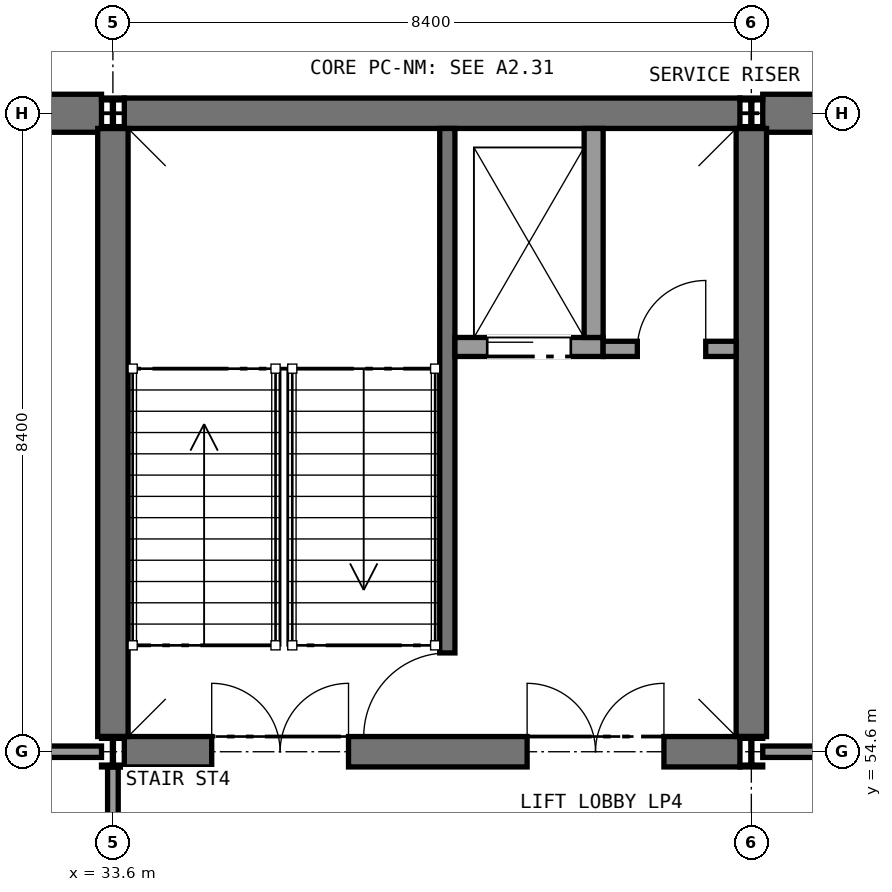
"""IFC4 building model, lengths in metres.
Left out: names, types, materials, properties, quantities, classifications, styles, units other than length and angle.
Written with IfcOpenShell. Run it as: python <this file> out.ifc"""

import sys

from ifc_helpers import new_model, si_unit, direction, frame, frame_2d, origin, origin_2d, place, context, subcontext, project, spatial, rectangle, i_section, extrude, element, fill, save


model = new_model("IFC4")
c1 = context("Model", 3, precision=1e-05, world=origin(), true_north=direction((0.0, 1.0)))
c2 = subcontext(c1, "Body", "Model", "MODEL_VIEW")
j1 = project(units=[si_unit("LENGTHUNIT", "METRE"), si_unit("PLANEANGLEUNIT", "RADIAN")], contexts=[c1])
p1 = place(None, origin())
s1 = spatial("IfcSite", under=j1, at=p1, CompositionType="ELEMENT")
p2 = place(p1, origin())
s2 = spatial("IfcBuilding", under=s1, at=p2, CompositionType="ELEMENT")
p3 = place(p2, frame((0.0, 0.0, 21.0)))
s3 = spatial("IfcBuildingStorey", under=s2, at=p3, CompositionType="ELEMENT", Elevation=21.0)
p4 = place(p3, frame((25.35, 63.0, 0.0), z_axis=(0.0, 0.0, 1.0), x_axis=(1.0, 0.0, 0.0)))
e1 = element("IfcWall", 1, at=p4, inside=s3, PredefinedType="SHEAR", context=c2, shape_type="SweptSolid", body=[
    extrude(rectangle(XDim=8.1, YDim=0.5, at=frame_2d((4.05, 0.0))), origin(), (0.0, 0.0, 1.0), 4.65),
])
p5 = place(p3, frame((42.15, 63.0, 0.0), z_axis=(0.0, 0.0, 1.0), x_axis=(1.0, 0.0, 0.0)))
e2 = element("IfcWall", 2, at=p5, inside=s3, PredefinedType="SHEAR", context=c2, shape_type="SweptSolid", body=[
    extrude(rectangle(XDim=8.1, YDim=0.5, at=frame_2d((4.05, 0.0))), origin(), (0.0, 0.0, 1.0), 4.65),
])
p6 = place(p3, frame((33.75, 63.0, 0.0), z_axis=(0.0, 0.0, 1.0), x_axis=(1.0, 0.0, 0.0)))
e3 = element("IfcWall", 3, at=p6, inside=s3, PredefinedType="SHEAR", context=c2, shape_type="SweptSolid", body=[
    extrude(rectangle(XDim=8.1, YDim=0.4, at=frame_2d((4.05, 0.0))), origin(), (0.0, 0.0, 1.0), 4.65),
])
p7 = place(p3, frame((33.75, 54.6, 0.0), z_axis=(0.0, 0.0, 1.0), x_axis=(1.0, 0.0, 0.0)))
e4 = element("IfcWall", 4, at=p7, inside=s3, PredefinedType="SHEAR", context=c2, shape_type="SweptSolid", body=[
    extrude(rectangle(XDim=8.1, YDim=0.4, at=frame_2d((4.05, 0.0))), origin(), (0.0, 0.0, 1.0), 4.65),
])
p8 = place(p7, frame((1.15, 0.0, 0.0)))
e5 = element("IfcOpeningElement", 5, at=p8, cuts=e4, PredefinedType="OPENING", context=c2, shape_type="SweptSolid", body=[
    extrude(rectangle(XDim=1.8, YDim=2.1, at=frame_2d((0.9, 1.05))), frame((0.0, 0.21, 0.0), z_axis=(0.0, -1.0, 0.0), x_axis=(1.0, 0.0, 0.0)), (0.0, 0.0, 1.0), 0.42),
])
p9 = place(p7, frame((5.3, 0.0, 0.0)))
e6 = element("IfcOpeningElement", 6, at=p9, cuts=e4, PredefinedType="OPENING", context=c2, shape_type="SweptSolid", body=[
    extrude(rectangle(XDim=1.8, YDim=2.1, at=frame_2d((0.9, 1.05))), frame((0.0, 0.21, 0.0), z_axis=(0.0, -1.0, 0.0), x_axis=(1.0, 0.0, 0.0)), (0.0, 0.0, 1.0), 0.42),
])
for number, where, z_axis, x_axis in (
    (7, (33.6, 54.8, 0.0), (0.0, 0.0, 1.0), (0.0, 1.0, 0.0)),
    (8, (42.0, 54.8, 0.0), (0.0, 0.0, 1.0), (0.0, 1.0, 0.0)),
):
    element("IfcWall", number, at=place(p3, frame(where, z_axis=z_axis, x_axis=x_axis)), inside=s3, PredefinedType="SHEAR", context=c2, shape_type="SweptSolid", body=[
        extrude(rectangle(XDim=8.0, YDim=0.4, at=frame_2d((4.0, 0.0))), origin(), (0.0, 0.0, 1.0), 4.65),
    ])
for number, where, z_axis, x_axis in (
    (9, (33.6, 54.6, 0.0), (0.0, 0.0, 1.0), (1.0, 0.0, 0.0)),
    (10, (33.6, 63.0, 0.0), (0.0, 0.0, 1.0), (1.0, 0.0, 0.0)),
    (11, (42.0, 54.6, 0.0), (0.0, 0.0, 1.0), (1.0, 0.0, 0.0)),
    (12, (42.0, 63.0, 0.0), (0.0, 0.0, 1.0), (1.0, 0.0, 0.0)),
):
    element("IfcColumn", number, at=place(p3, frame(where, z_axis=z_axis, x_axis=x_axis)), inside=s3, PredefinedType="COLUMN", context=c2, shape_type="SweptSolid", body=[
        extrude(i_section(OverallWidth=0.3, OverallDepth=0.4, WebThickness=0.013, FlangeThickness=0.024, FilletRadius=0.027, at=origin_2d()), origin(), (0.0, 0.0, 1.0), 4.8),
    ])
p10 = place(p3, frame((25.35, 54.6, 0.0), z_axis=(0.0, 0.0, 1.0), x_axis=(1.0, 0.0, 0.0)))
e13 = element("IfcWall", 13, at=p10, inside=s3, PredefinedType="SOLIDWALL", context=c2, shape_type="SweptSolid", body=[
    extrude(rectangle(XDim=8.1, YDim=0.15, at=frame_2d((4.05, 0.0))), origin(), (0.0, 0.0, 1.0), 4.3),
])
p11 = place(p10, frame((3.35, 0.0, 0.0)))
e14 = element("IfcOpeningElement", 14, at=p11, cuts=e13, PredefinedType="OPENING", context=c2, shape_type="SweptSolid", body=[
    extrude(rectangle(XDim=1.5, YDim=2.1, at=frame_2d((0.75, 1.05))), frame((0.0, 0.085, 0.0), z_axis=(0.0, -1.0, 0.0), x_axis=(1.0, 0.0, 0.0)), (0.0, 0.0, 1.0), 0.17),
])
p12 = place(p3, frame((42.15, 54.6, 0.0), z_axis=(0.0, 0.0, 1.0), x_axis=(1.0, 0.0, 0.0)))
e15 = element("IfcWall", 15, at=p12, inside=s3, PredefinedType="SOLIDWALL", context=c2, shape_type="SweptSolid", body=[
    extrude(rectangle(XDim=8.1, YDim=0.15, at=frame_2d((4.05, 0.0))), origin(), (0.0, 0.0, 1.0), 4.3),
])
p13 = place(p3, frame((33.6, 51.3, 0.0), z_axis=(0.0, 0.0, 1.0), x_axis=(0.0, 1.0, 0.0)))
e16 = element("IfcWall", 16, at=p13, inside=s3, PredefinedType="PARTITIONING", context=c2, shape_type="SweptSolid", body=[
    extrude(rectangle(XDim=3.1, YDim=0.14, at=frame_2d((1.55, 0.0))), origin(), (0.0, 0.0, 1.0), 4.16),
])
p14 = place(p3, frame((38.0, 62.8, 0.0), z_axis=(0.0, 0.0, 1.0), x_axis=(0.0, -1.0, 0.0)))
e17 = element("IfcWall", 17, at=p14, inside=s3, PredefinedType="SHEAR", context=c2, shape_type="SweptSolid", body=[
    extrude(rectangle(XDim=8.0, YDim=0.2, at=frame_2d((4.0, 0.0))), origin(), (0.0, 0.0, 1.0), 4.65),
])
p15 = place(p14, frame((6.9, 0.0, 0.0)))
e18 = element("IfcOpeningElement", 18, at=p15, cuts=e17, PredefinedType="OPENING", context=c2, shape_type="SweptSolid", body=[
    extrude(rectangle(XDim=1.11, YDim=2.1, at=frame_2d((0.555, 1.05))), frame((0.0, 0.11, 0.0), z_axis=(0.0, -1.0, 0.0), x_axis=(1.0, 0.0, 0.0)), (0.0, 0.0, 1.0), 0.22),
])
p16 = place(p3, frame((38.1, 59.925, 0.0), z_axis=(0.0, 0.0, 1.0), x_axis=(1.0, 0.0, 0.0)))
e19 = element("IfcWall", 19, at=p16, inside=s3, PredefinedType="SOLIDWALL", context=c2, shape_type="SweptSolid", body=[
    extrude(rectangle(XDim=1.95, YDim=0.25, at=frame_2d((0.975, 0.0))), origin(), (0.0, 0.0, 1.0), 4.8),
])
p17 = place(p16, frame((0.425, 0.0, 0.0)))
e20 = element("IfcOpeningElement", 20, at=p17, cuts=e19, PredefinedType="OPENING", context=c2, shape_type="SweptSolid", body=[
    extrude(rectangle(XDim=1.1, YDim=2.1, at=frame_2d((0.55, 1.05))), frame((0.0, 0.135, 0.0), z_axis=(0.0, -1.0, 0.0), x_axis=(1.0, 0.0, 0.0)), (0.0, 0.0, 1.0), 0.27),
])
p18 = place(p3, frame((39.925, 62.8, 0.0), z_axis=(0.0, 0.0, 1.0), x_axis=(0.0, -1.0, 0.0)))
e21 = element("IfcWall", 21, at=p18, inside=s3, PredefinedType="SOLIDWALL", context=c2, shape_type="SweptSolid", body=[
    extrude(rectangle(XDim=2.75, YDim=0.25, at=frame_2d((1.375, 0.0))), origin(), (0.0, 0.0, 1.0), 4.8),
])
p19 = place(p3, frame((40.05, 59.9, 0.0), z_axis=(0.0, 0.0, 1.0), x_axis=(1.0, 0.0, 0.0)))
e22 = element("IfcWall", 22, at=p19, inside=s3, PredefinedType="PARTITIONING", context=c2, shape_type="SweptSolid", body=[
    extrude(rectangle(XDim=1.75, YDim=0.2, at=frame_2d((0.875, 0.0))), origin(), (0.0, 0.0, 1.0), 4.65),
])
p20 = place(p19, frame((0.45, 0.0, 0.0)))
e23 = element("IfcOpeningElement", 23, at=p20, cuts=e22, PredefinedType="OPENING", context=c2, shape_type="SweptSolid", body=[
    extrude(rectangle(XDim=0.9, YDim=2.1, at=frame_2d((0.45, 1.05))), frame((0.0, 0.11, 0.0), z_axis=(0.0, -1.0, 0.0), x_axis=(1.0, 0.0, 0.0)), (0.0, 0.0, 1.0), 0.22),
])
p21 = place(p15, frame((1.1, 0.0, 0.0), z_axis=(0.0, 0.0, 1.0), x_axis=(-1.0, 0.0, 0.0)))
e24 = element("IfcDoor", 24, at=p21, inside=s3, OperationType="SINGLE_SWING_LEFT", PredefinedType="DOOR", context=c2, shape_type="SweptSolid", body=[
    extrude(rectangle(XDim=1.1, YDim=2.1, at=frame_2d((0.55, 1.05))), frame((0.0, 0.025, 0.0), z_axis=(0.0, -1.0, 0.0), x_axis=(1.0, 0.0, 0.0)), (0.0, 0.0, 1.0), 0.05),
])
fill(e18, e24)
p22 = place(p17, frame((1.1, 0.0, 0.0), z_axis=(0.0, 0.0, 1.0), x_axis=(-1.0, 0.0, 0.0)))
e25 = element("IfcDoor", 25, at=p22, inside=s3, OperationType="SLIDING_TO_RIGHT", PredefinedType="DOOR", context=c2, shape_type="SweptSolid", body=[
    extrude(rectangle(XDim=1.1, YDim=2.1, at=frame_2d((0.55, 1.05))), frame((0.0, 0.025, 0.0), z_axis=(0.0, -1.0, 0.0), x_axis=(1.0, 0.0, 0.0)), (0.0, 0.0, 1.0), 0.05),
])
fill(e20, e25)
p23 = place(p20, origin())
e26 = element("IfcDoor", 26, at=p23, inside=s3, OperationType="SINGLE_SWING_RIGHT", PredefinedType="DOOR", context=c2, shape_type="SweptSolid", body=[
    extrude(rectangle(XDim=0.9, YDim=2.1, at=frame_2d((0.45, 1.05))), frame((0.0, 0.025, 0.0), z_axis=(0.0, -1.0, 0.0), x_axis=(1.0, 0.0, 0.0)), (0.0, 0.0, 1.0), 0.05),
])
fill(e23, e26)
p24 = place(p8, origin())
e27 = element("IfcDoor", 27, at=p24, inside=s3, OperationType="DOUBLE_DOOR_SINGLE_SWING", PredefinedType="DOOR", context=c2, shape_type="SweptSolid", body=[
    extrude(rectangle(XDim=1.8, YDim=2.1, at=frame_2d((0.9, 1.05))), frame((0.0, 0.025, 0.0), z_axis=(0.0, -1.0, 0.0), x_axis=(1.0, 0.0, 0.0)), (0.0, 0.0, 1.0), 0.05),
])
fill(e5, e27)
p25 = place(p9, origin())
e28 = element("IfcDoor", 28, at=p25, inside=s3, OperationType="DOUBLE_DOOR_SINGLE_SWING", PredefinedType="DOOR", context=c2, shape_type="SweptSolid", body=[
    extrude(rectangle(XDim=1.8, YDim=2.1, at=frame_2d((0.9, 1.05))), frame((0.0, 0.025, 0.0), z_axis=(0.0, -1.0, 0.0), x_axis=(1.0, 0.0, 0.0)), (0.0, 0.0, 1.0), 0.05),
])
fill(e6, e28)
save(model, sys.argv[1])
